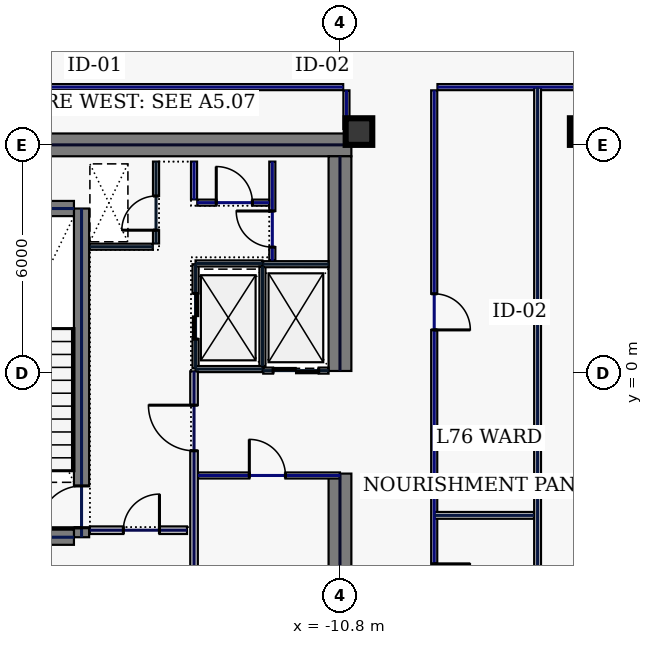
"""IFC4 building model, lengths in metres.
Left out: names, types, materials, properties, quantities, classifications, styles, units other than length and angle.
Written with IfcOpenShell. Run it as: python <this file> out.ifc"""

import sys

from ifc_helpers import new_model, si_unit, direction, frame, frame_2d, origin, origin_2d, place, context, subcontext, project, spatial, rectangle, hollow_rectangle, extrude, element, fill, save


model = new_model("IFC4")
c1 = context("Model", 3, precision=1e-05, world=origin(), true_north=direction((0.0, 1.0)))
c2 = subcontext(c1, "Body", "Model", "MODEL_VIEW")
j1 = project(units=[si_unit("LENGTHUNIT", "METRE"), si_unit("PLANEANGLEUNIT", "RADIAN")], contexts=[c1])
p1 = place(None, origin())
s1 = spatial("IfcSite", under=j1, at=p1, CompositionType="ELEMENT")
p2 = place(p1, origin())
s2 = spatial("IfcBuilding", under=s1, at=p2, CompositionType="ELEMENT")
p3 = place(p2, frame((0.0, 0.0, 325.0)))
s3 = spatial("IfcBuildingStorey", under=s2, at=p3, CompositionType="ELEMENT", Elevation=325.0)
p4 = place(p3, frame((-22.0, 6.0, 0.0), z_axis=(0.0, 0.0, 1.0), x_axis=(1.0, 0.0, 0.0)))
e1 = element("IfcWall", 1, at=p4, inside=s3, PredefinedType="SHEAR", context=c2, shape_type="SweptSolid", body=[
    extrude(rectangle(XDim=11.5, YDim=0.6, at=frame_2d((5.75, 0.0))), origin(), (0.0, 0.0, 1.0), 3.74),
])
p5 = place(p3, frame((-10.8, -5.7, 0.0), z_axis=(0.0, 0.0, 1.0), x_axis=(0.0, 1.0, 0.0)))
e2 = element("IfcWall", 2, at=p5, inside=s3, PredefinedType="SHEAR", context=c2, shape_type="SweptSolid", body=[
    extrude(rectangle(XDim=3.05, YDim=0.6, at=frame_2d((1.525, 0.0))), origin(), (0.0, 0.0, 1.0), 3.74),
])
p6 = place(p3, frame((-10.8, 0.05, 0.0), z_axis=(0.0, 0.0, 1.0), x_axis=(0.0, 1.0, 0.0)))
e3 = element("IfcWall", 3, at=p6, inside=s3, PredefinedType="SHEAR", context=c2, shape_type="SweptSolid", body=[
    extrude(rectangle(XDim=5.65, YDim=0.6, at=frame_2d((2.825, 0.0))), origin(), (0.0, 0.0, 1.0), 3.74),
])
p7 = place(p3, frame((-17.6, -4.325, 0.0), z_axis=(0.0, 0.0, 1.0), x_axis=(0.0, 1.0, 0.0)))
e4 = element("IfcWall", 4, at=p7, inside=s3, PredefinedType="SHEAR", context=c2, shape_type="SweptSolid", body=[
    extrude(rectangle(XDim=8.65, YDim=0.4, at=frame_2d((4.325, 0.0))), origin(), (0.0, 0.0, 1.0), 3.74),
])
p8 = place(p7, frame((0.25, 0.0, 0.0)))
e5 = element("IfcOpeningElement", 5, at=p8, cuts=e4, PredefinedType="OPENING", context=c2, shape_type="SweptSolid", body=[
    extrude(rectangle(XDim=1.1, YDim=2.2, at=frame_2d((0.55, 1.1))), frame((0.0, 0.21, 0.0), z_axis=(0.0, -1.0, 0.0), x_axis=(1.0, 0.0, 0.0)), (0.0, 0.0, 1.0), 0.42),
])
for number, where, z_axis, x_axis in (
    (6, (-21.2, -4.325, 0.0), (0.0, 0.0, 1.0), (1.0, 0.0, 0.0)),
    (7, (-21.2, 4.325, 0.0), (0.0, 0.0, 1.0), (1.0, 0.0, 0.0)),
):
    element("IfcWall", number, at=place(p3, frame(where, z_axis=z_axis, x_axis=x_axis)), inside=s3, PredefinedType="SHEAR", context=c2, shape_type="SweptSolid", body=[
        extrude(rectangle(XDim=3.4, YDim=0.4, at=frame_2d((1.7, 0.0))), origin(), (0.0, 0.0, 1.0), 3.74),
    ])
for number, where, z_axis, x_axis in (
    (8, (-10.3, 6.35, 0.0), (0.0, 0.0, 1.0), (1.0, 0.0, 0.0)),
    (9, (-4.4, 6.35, 0.0), (0.0, 0.0, 1.0), (1.0, 0.0, 0.0)),
):
    element("IfcColumn", number, at=place(p3, frame(where, z_axis=z_axis, x_axis=x_axis)), inside=s3, PredefinedType="COLUMN", context=c2, shape_type="SweptSolid", body=[
        extrude(hollow_rectangle(XDim=0.7, YDim=0.7, WallThickness=0.032, at=origin_2d()), origin(), (0.0, 0.0, 1.0), 3.74),
    ])
p9 = place(p3, frame((-14.6, 0.12, 0.0), z_axis=(0.0, 0.0, 1.0), x_axis=(0.0, 1.0, 0.0)))
e10 = element("IfcWall", 10, at=p9, inside=s3, PredefinedType="PARTITIONING", context=c2, shape_type="SweptSolid", body=[
    extrude(rectangle(XDim=2.74, YDim=0.16, at=frame_2d((1.37, 0.0))), origin(), (0.0, 0.0, 1.0), 3.74),
])
p10 = place(p9, frame((0.77, 0.0, 0.0)))
e11 = element("IfcOpeningElement", 11, at=p10, cuts=e10, PredefinedType="OPENING", context=c2, shape_type="SweptSolid", body=[
    extrude(rectangle(XDim=1.2, YDim=2.2, at=frame_2d((0.6, 1.1))), frame((0.0, 0.09, 0.0), z_axis=(0.0, -1.0, 0.0), x_axis=(1.0, 0.0, 0.0)), (0.0, 0.0, 1.0), 0.18),
])
for number, where, z_axis, x_axis in (
    (12, (-14.6, 0.1, 0.0), (0.0, 0.0, 1.0), (1.0, 0.0, 0.0)),
    (13, (-14.6, 2.88, 0.0), (0.0, 0.0, 1.0), (1.0, 0.0, 0.0)),
):
    element("IfcWall", number, at=place(p3, frame(where, z_axis=z_axis, x_axis=x_axis)), inside=s3, PredefinedType="PARTITIONING", context=c2, shape_type="SweptSolid", body=[
        extrude(rectangle(XDim=1.76, YDim=0.16, at=frame_2d((0.88, 0.0))), origin(), (0.0, 0.0, 1.0), 3.74),
    ])
p11 = place(p3, frame((-12.84, 0.18, 0.0), z_axis=(0.0, 0.0, 1.0), x_axis=(0.0, 1.0, 0.0)))
e14 = element("IfcWall", 14, at=p11, inside=s3, PredefinedType="PARTITIONING", context=c2, shape_type="SweptSolid", body=[
    extrude(rectangle(XDim=2.62, YDim=0.16, at=frame_2d((1.31, 0.0))), origin(), (0.0, 0.0, 1.0), 3.74),
])
p12 = place(p3, frame((-12.82, 0.06, 0.0), z_axis=(0.0, 0.0, 1.0), x_axis=(1.0, 0.0, 0.0)))
e15 = element("IfcWall", 15, at=p12, inside=s3, PredefinedType="PARTITIONING", context=c2, shape_type="SweptSolid", body=[
    extrude(rectangle(XDim=1.72, YDim=0.16, at=frame_2d((0.86, 0.0))), origin(), (0.0, 0.0, 1.0), 3.74),
])
p13 = place(p12, frame((0.26, 0.0, 0.0)))
e16 = element("IfcOpeningElement", 16, at=p13, cuts=e15, PredefinedType="OPENING", context=c2, shape_type="SweptSolid", body=[
    extrude(rectangle(XDim=1.2, YDim=2.2, at=frame_2d((0.6, 1.1))), frame((0.0, 0.09, 0.0), z_axis=(0.0, -1.0, 0.0), x_axis=(1.0, 0.0, 0.0)), (0.0, 0.0, 1.0), 0.18),
])
p14 = place(p3, frame((-12.82, 2.86, 0.0), z_axis=(0.0, 0.0, 1.0), x_axis=(1.0, 0.0, 0.0)))
e17 = element("IfcWall", 17, at=p14, inside=s3, PredefinedType="PARTITIONING", context=c2, shape_type="SweptSolid", body=[
    extrude(rectangle(XDim=1.72, YDim=0.16, at=frame_2d((0.86, 0.0))), origin(), (0.0, 0.0, 1.0), 3.74),
])
p15 = place(p3, frame((-15.64, 3.405, 0.0), z_axis=(0.0, 0.0, 1.0), x_axis=(0.0, 1.0, 0.0)))
e18 = element("IfcWall", 18, at=p15, inside=s3, PredefinedType="PARTITIONING", context=c2, shape_type="SweptSolid", body=[
    extrude(rectangle(XDim=2.155, YDim=0.16, at=frame_2d((1.078, 0.0))), origin(), (0.0, 0.0, 1.0), 3.74),
])
p16 = place(p15, frame((0.35, 0.0, 0.0)))
e19 = element("IfcOpeningElement", 19, at=p16, cuts=e18, PredefinedType="OPENING", context=c2, shape_type="SweptSolid", body=[
    extrude(rectangle(XDim=0.9, YDim=2.2, at=frame_2d((0.45, 1.1))), frame((0.0, 0.09, 0.0), z_axis=(0.0, -1.0, 0.0), x_axis=(1.0, 0.0, 0.0)), (0.0, 0.0, 1.0), 0.18),
])
p17 = place(p3, frame((-17.38, 3.32, 0.0), z_axis=(0.0, 0.0, 1.0), x_axis=(1.0, 0.0, 0.0)))
e20 = element("IfcWall", 20, at=p17, inside=s3, PredefinedType="PARTITIONING", context=c2, shape_type="SweptSolid", body=[
    extrude(rectangle(XDim=1.655, YDim=0.16, at=frame_2d((0.827, 0.0))), origin(), (0.0, 0.0, 1.0), 3.74),
])
p18 = place(p3, frame((-17.38, -4.14, 0.0), z_axis=(0.0, 0.0, 1.0), x_axis=(1.0, 0.0, 0.0)))
e21 = element("IfcWall", 21, at=p18, inside=s3, PredefinedType="SOLIDWALL", context=c2, shape_type="SweptSolid", body=[
    extrude(rectangle(XDim=2.555, YDim=0.2, at=frame_2d((1.277, 0.0))), origin(), (0.0, 0.0, 1.0), 3.74),
])
p19 = place(p18, frame((0.88, 0.0, 0.0)))
e22 = element("IfcOpeningElement", 22, at=p19, cuts=e21, PredefinedType="OPENING", context=c2, shape_type="SweptSolid", body=[
    extrude(rectangle(XDim=0.95, YDim=2.2, at=frame_2d((0.475, 1.1))), frame((0.0, 0.11, 0.0), z_axis=(0.0, -1.0, 0.0), x_axis=(1.0, 0.0, 0.0)), (0.0, 0.0, 1.0), 0.22),
])
p20 = place(p3, frame((-14.535, -2.7, 0.0), z_axis=(0.0, 0.0, 1.0), x_axis=(1.0, 0.0, 0.0)))
e23 = element("IfcWall", 23, at=p20, inside=s3, PredefinedType="PARTITIONING", context=c2, shape_type="SweptSolid", body=[
    extrude(rectangle(XDim=3.735, YDim=0.16, at=frame_2d((1.867, 0.0))), origin(), (0.0, 0.0, 1.0), 3.74),
])
p21 = place(p20, frame((1.35, 0.0, 0.0)))
e24 = element("IfcOpeningElement", 24, at=p21, cuts=e23, PredefinedType="OPENING", context=c2, shape_type="SweptSolid", body=[
    extrude(rectangle(XDim=0.95, YDim=2.2, at=frame_2d((0.475, 1.1))), frame((0.0, 0.09, 0.0), z_axis=(0.0, -1.0, 0.0), x_axis=(1.0, 0.0, 0.0)), (0.0, 0.0, 1.0), 0.18),
])
p22 = place(p3, frame((-12.58, 2.96, 0.0), z_axis=(0.0, 0.0, 1.0), x_axis=(0.0, 1.0, 0.0)))
e25 = element("IfcWall", 25, at=p22, inside=s3, PredefinedType="PARTITIONING", context=c2, shape_type="SweptSolid", body=[
    extrude(rectangle(XDim=2.6, YDim=0.16, at=frame_2d((1.3, 0.0))), origin(), (0.0, 0.0, 1.0), 3.74),
])
p23 = place(p22, frame((0.35, 0.0, 0.0)))
e26 = element("IfcOpeningElement", 26, at=p23, cuts=e25, PredefinedType="OPENING", context=c2, shape_type="SweptSolid", body=[
    extrude(rectangle(XDim=0.95, YDim=2.2, at=frame_2d((0.475, 1.1))), frame((0.0, 0.09, 0.0), z_axis=(0.0, -1.0, 0.0), x_axis=(1.0, 0.0, 0.0)), (0.0, 0.0, 1.0), 0.18),
])
p24 = place(p3, frame((-14.555, 4.48, 0.0), z_axis=(0.0, 0.0, 1.0), x_axis=(1.0, 0.0, 0.0)))
e27 = element("IfcWall", 27, at=p24, inside=s3, PredefinedType="PARTITIONING", context=c2, shape_type="SweptSolid", body=[
    extrude(rectangle(XDim=1.89, YDim=0.16, at=frame_2d((0.945, 0.0))), origin(), (0.0, 0.0, 1.0), 3.74),
])
p25 = place(p24, frame((0.5, 0.0, 0.0)))
e28 = element("IfcOpeningElement", 28, at=p25, cuts=e27, PredefinedType="OPENING", context=c2, shape_type="SweptSolid", body=[
    extrude(rectangle(XDim=0.95, YDim=2.2, at=frame_2d((0.475, 1.1))), frame((0.0, 0.09, 0.0), z_axis=(0.0, -1.0, 0.0), x_axis=(1.0, 0.0, 0.0)), (0.0, 0.0, 1.0), 0.18),
])
p26 = place(p3, frame((-14.64, 4.565, 0.0), z_axis=(0.0, 0.0, 1.0), x_axis=(0.0, 1.0, 0.0)))
e29 = element("IfcWall", 29, at=p26, inside=s3, PredefinedType="PARTITIONING", context=c2, shape_type="SweptSolid", body=[
    extrude(rectangle(XDim=0.995, YDim=0.16, at=frame_2d((0.498, 0.0))), origin(), (0.0, 0.0, 1.0), 3.74),
])
p27 = place(p3, frame((-14.64, -5.56, 0.0), z_axis=(0.0, 0.0, 1.0), x_axis=(0.0, 1.0, 0.0)))
e30 = element("IfcWall", 30, at=p27, inside=s3, PredefinedType="SOLIDWALL", context=c2, shape_type="SweptSolid", body=[
    extrude(rectangle(XDim=5.6, YDim=0.2, at=frame_2d((2.8, 0.0))), origin(), (0.0, 0.0, 1.0), 3.74),
])
p28 = place(p27, frame((3.51, 0.0, 0.0)))
e31 = element("IfcOpeningElement", 31, at=p28, cuts=e30, PredefinedType="OPENING", context=c2, shape_type="SweptSolid", body=[
    extrude(rectangle(XDim=1.2, YDim=2.2, at=frame_2d((0.6, 1.1))), frame((0.0, 0.11, 0.0), z_axis=(0.0, -1.0, 0.0), x_axis=(1.0, 0.0, 0.0)), (0.0, 0.0, 1.0), 0.22),
])
p29 = place(p3, frame((-3.965, 7.52, 0.0), z_axis=(0.0, 0.0, 1.0), x_axis=(-1.0, 0.0, 0.0)))
e32 = element("IfcWall", 32, at=p29, inside=s3, PredefinedType="PARTITIONING", context=c2, shape_type="SweptSolid", body=[
    extrude(rectangle(XDim=4.27, YDim=0.16, at=frame_2d((2.135, 0.0))), origin(), (0.0, 0.0, 1.0), 3.74),
])
p30 = place(p3, frame((-8.32, 7.435, 0.0), z_axis=(0.0, 0.0, 1.0), x_axis=(0.0, -1.0, 0.0)))
e33 = element("IfcWall", 33, at=p30, inside=s3, PredefinedType="PARTITIONING", context=c2, shape_type="SweptSolid", body=[
    extrude(rectangle(XDim=14.82, YDim=0.16, at=frame_2d((7.41, 0.0))), origin(), (0.0, 0.0, 1.0), 3.74),
])
p31 = place(p30, frame((12.461, 0.0, 0.0)))
e34 = element("IfcOpeningElement", 34, at=p31, cuts=e33, PredefinedType="OPENING", context=c2, shape_type="SweptSolid", body=[
    extrude(rectangle(XDim=0.95, YDim=2.2, at=frame_2d((0.475, 1.1))), frame((0.0, 0.09, 0.0), z_axis=(0.0, -1.0, 0.0), x_axis=(1.0, 0.0, 0.0)), (0.0, 0.0, 1.0), 0.18),
])
p32 = place(p30, frame((5.354, 0.0, 0.0)))
e35 = element("IfcOpeningElement", 35, at=p32, cuts=e33, PredefinedType="OPENING", context=c2, shape_type="SweptSolid", body=[
    extrude(rectangle(XDim=0.95, YDim=2.2, at=frame_2d((0.475, 1.1))), frame((0.0, 0.09, 0.0), z_axis=(0.0, -1.0, 0.0), x_axis=(1.0, 0.0, 0.0)), (0.0, 0.0, 1.0), 0.18),
])
p33 = place(p3, frame((-10.63, 6.42, 0.0), z_axis=(0.0, 0.0, 1.0), x_axis=(0.0, 1.0, 0.0)))
e36 = element("IfcWall", 36, at=p33, inside=s3, PredefinedType="PARTITIONING", context=c2, shape_type="SweptSolid", body=[
    extrude(rectangle(XDim=1.015, YDim=0.16, at=frame_2d((0.508, 0.0))), origin(), (0.0, 0.0, 1.0), 3.74),
])
p34 = place(p3, frame((-10.715, 7.52, 0.0), z_axis=(0.0, 0.0, 1.0), x_axis=(-1.0, 0.0, 0.0)))
e37 = element("IfcWall", 37, at=p34, inside=s3, PredefinedType="PARTITIONING", context=c2, shape_type="SweptSolid", body=[
    extrude(rectangle(XDim=11.2, YDim=0.16, at=frame_2d((5.6, 0.0))), origin(), (0.0, 0.0, 1.0), 3.74),
])
p35 = place(p3, frame((-5.6, -7.465, 0.0), z_axis=(0.0, 0.0, 1.0), x_axis=(0.0, 1.0, 0.0)))
e38 = element("IfcWall", 38, at=p35, inside=s3, PredefinedType="PARTITIONING", context=c2, shape_type="SweptSolid", body=[
    extrude(rectangle(XDim=14.98, YDim=0.18, at=frame_2d((7.49, 0.0))), origin(), (0.0, 0.0, 1.0), 3.74),
])
p36 = place(p3, frame((-8.315, -3.75, 0.0), z_axis=(0.0, 0.0, 1.0), x_axis=(1.0, 0.0, 0.0)))
e39 = element("IfcWall", 39, at=p36, inside=s3, PredefinedType="PARTITIONING", context=c2, shape_type="SweptSolid", body=[
    extrude(rectangle(XDim=2.62, YDim=0.18, at=frame_2d((1.31, 0.0))), origin(), (0.0, 0.0, 1.0), 3.74),
])
p37 = place(p8, origin())
e40 = element("IfcDoor", 40, at=p37, inside=s3, OperationType="SINGLE_SWING_LEFT", PredefinedType="DOOR", context=c2, shape_type="SweptSolid", body=[
    extrude(rectangle(XDim=1.1, YDim=2.2, at=frame_2d((0.55, 1.1))), frame((0.0, 0.025, 0.0), z_axis=(0.0, -1.0, 0.0), x_axis=(1.0, 0.0, 0.0)), (0.0, 0.0, 1.0), 0.05),
])
fill(e5, e40)
p38 = place(p10, origin())
e41 = element("IfcDoor", 41, at=p38, inside=s3, OperationType="SLIDING_TO_LEFT", PredefinedType="DOOR", context=c2, shape_type="SweptSolid", body=[
    extrude(rectangle(XDim=1.2, YDim=2.2, at=frame_2d((0.6, 1.1))), frame((0.0, 0.025, 0.0), z_axis=(0.0, -1.0, 0.0), x_axis=(1.0, 0.0, 0.0)), (0.0, 0.0, 1.0), 0.05),
])
fill(e11, e41)
p39 = place(p13, origin())
e42 = element("IfcDoor", 42, at=p39, inside=s3, OperationType="SLIDING_TO_LEFT", PredefinedType="DOOR", context=c2, shape_type="SweptSolid", body=[
    extrude(rectangle(XDim=1.2, YDim=2.2, at=frame_2d((0.6, 1.1))), frame((0.0, 0.025, 0.0), z_axis=(0.0, -1.0, 0.0), x_axis=(1.0, 0.0, 0.0)), (0.0, 0.0, 1.0), 0.05),
])
fill(e16, e42)
p40 = place(p16, origin())
e43 = element("IfcDoor", 43, at=p40, inside=s3, OperationType="SINGLE_SWING_LEFT", PredefinedType="DOOR", context=c2, shape_type="SweptSolid", body=[
    extrude(rectangle(XDim=0.9, YDim=2.2, at=frame_2d((0.45, 1.1))), frame((0.0, 0.025, 0.0), z_axis=(0.0, -1.0, 0.0), x_axis=(1.0, 0.0, 0.0)), (0.0, 0.0, 1.0), 0.05),
])
fill(e19, e43)
p41 = place(p19, origin())
e44 = element("IfcDoor", 44, at=p41, inside=s3, OperationType="SINGLE_SWING_RIGHT", PredefinedType="DOOR", context=c2, shape_type="SweptSolid", body=[
    extrude(rectangle(XDim=0.95, YDim=2.2, at=frame_2d((0.475, 1.1))), frame((0.0, 0.025, 0.0), z_axis=(0.0, -1.0, 0.0), x_axis=(1.0, 0.0, 0.0)), (0.0, 0.0, 1.0), 0.05),
])
fill(e22, e44)
p42 = place(p21, origin())
e45 = element("IfcDoor", 45, at=p42, inside=s3, OperationType="SINGLE_SWING_LEFT", PredefinedType="DOOR", context=c2, shape_type="SweptSolid", body=[
    extrude(rectangle(XDim=0.95, YDim=2.2, at=frame_2d((0.475, 1.1))), frame((0.0, 0.025, 0.0), z_axis=(0.0, -1.0, 0.0), x_axis=(1.0, 0.0, 0.0)), (0.0, 0.0, 1.0), 0.05),
])
fill(e24, e45)
p43 = place(p23, origin())
e46 = element("IfcDoor", 46, at=p43, inside=s3, OperationType="SINGLE_SWING_RIGHT", PredefinedType="DOOR", context=c2, shape_type="SweptSolid", body=[
    extrude(rectangle(XDim=0.95, YDim=2.2, at=frame_2d((0.475, 1.1))), frame((0.0, 0.025, 0.0), z_axis=(0.0, -1.0, 0.0), x_axis=(1.0, 0.0, 0.0)), (0.0, 0.0, 1.0), 0.05),
])
fill(e26, e46)
p44 = place(p25, origin())
e47 = element("IfcDoor", 47, at=p44, inside=s3, OperationType="SINGLE_SWING_LEFT", PredefinedType="DOOR", context=c2, shape_type="SweptSolid", body=[
    extrude(rectangle(XDim=0.95, YDim=2.2, at=frame_2d((0.475, 1.1))), frame((0.0, 0.025, 0.0), z_axis=(0.0, -1.0, 0.0), x_axis=(1.0, 0.0, 0.0)), (0.0, 0.0, 1.0), 0.05),
])
fill(e28, e47)
p45 = place(p28, origin())
e48 = element("IfcDoor", 48, at=p45, inside=s3, OperationType="SINGLE_SWING_RIGHT", PredefinedType="DOOR", context=c2, shape_type="SweptSolid", body=[
    extrude(rectangle(XDim=1.2, YDim=2.2, at=frame_2d((0.6, 1.1))), frame((0.0, 0.025, 0.0), z_axis=(0.0, -1.0, 0.0), x_axis=(1.0, 0.0, 0.0)), (0.0, 0.0, 1.0), 0.05),
])
fill(e31, e48)
p46 = place(p31, origin())
e49 = element("IfcDoor", 49, at=p46, inside=s3, OperationType="SINGLE_SWING_LEFT", PredefinedType="DOOR", context=c2, shape_type="SweptSolid", body=[
    extrude(rectangle(XDim=0.95, YDim=2.2, at=frame_2d((0.475, 1.1))), frame((0.0, 0.025, 0.0), z_axis=(0.0, -1.0, 0.0), x_axis=(1.0, 0.0, 0.0)), (0.0, 0.0, 1.0), 0.05),
])
fill(e34, e49)
p47 = place(p32, origin())
e50 = element("IfcDoor", 50, at=p47, inside=s3, OperationType="SINGLE_SWING_RIGHT", PredefinedType="DOOR", context=c2, shape_type="SweptSolid", body=[
    extrude(rectangle(XDim=0.95, YDim=2.2, at=frame_2d((0.475, 1.1))), frame((0.0, 0.025, 0.0), z_axis=(0.0, -1.0, 0.0), x_axis=(1.0, 0.0, 0.0)), (0.0, 0.0, 1.0), 0.05),
])
fill(e35, e50)
save(model, sys.argv[1])
